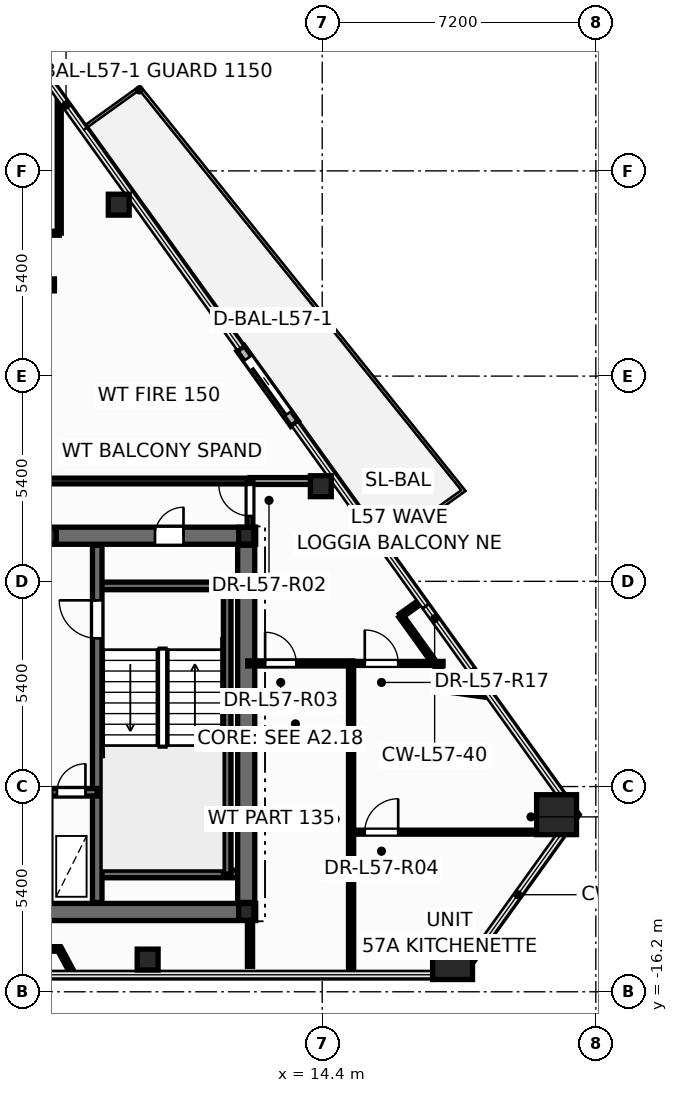
"""IFC4 building model, lengths in metres.
Left out: names, types, materials, properties, quantities, classifications, styles, units other than length and angle.
Written with IfcOpenShell. Run it as: python <this file> out.ifc"""

import sys

from ifc_helpers import new_model, si_unit, direction, frame, frame_2d, origin, origin_2d, place, context, subcontext, project, spatial, rectangle, hollow_rectangle, hollow_circle, i_section, extrude, element, fill, save


model = new_model("IFC4")
c1 = context("Model", 3, precision=1e-05, world=origin(), true_north=direction((0.0, 1.0)))
c2 = subcontext(c1, "Body", "Model", "MODEL_VIEW")
j1 = project(units=[si_unit("LENGTHUNIT", "METRE"), si_unit("PLANEANGLEUNIT", "RADIAN")], contexts=[c1])
p1 = place(None, origin())
s1 = spatial("IfcSite", under=j1, at=p1, CompositionType="ELEMENT")
p2 = place(p1, origin())
s2 = spatial("IfcBuilding", under=s1, at=p2, CompositionType="ELEMENT")
p3 = place(p2, frame((0.0, 0.0, 218.1)))
s3 = spatial("IfcBuildingStorey", under=s2, at=p3, CompositionType="ELEMENT", Elevation=218.1)
for number, where, z_axis, x_axis in (
    (1, (17.83, -15.352, 0.0), (0.0, 0.0, 1.0), (1.0, 0.0, 0.0)),
    (2, (20.567, -11.54, 0.0), (0.0, 0.0, 1.0), (1.0, 0.0, 0.0)),
):
    element("IfcColumn", number, at=place(p3, frame(where, z_axis=z_axis, x_axis=x_axis)), inside=s3, PredefinedType="COLUMN", context=c2, shape_type="SweptSolid", body=[
        extrude(hollow_rectangle(XDim=1.05, YDim=1.05, WallThickness=0.045, at=origin_2d()), origin(), (0.0, 0.0, 1.0), 3.6),
    ])
for number, where, z_axis, x_axis in (
    (3, (9.807, -15.352, 0.0), (0.0, 0.0, 1.0), (1.0, 0.0, 0.0)),
    (4, (14.363, -2.897, 0.0), (0.0, 0.0, 1.0), (1.0, 0.0, 0.0)),
    (5, (9.046, 4.51, 0.0), (0.0, 0.0, 1.0), (1.0, 0.0, 0.0)),
):
    element("IfcColumn", number, at=place(p3, frame(where, z_axis=z_axis, x_axis=x_axis)), inside=s3, PredefinedType="COLUMN", context=c2, shape_type="SweptSolid", body=[
        extrude(hollow_circle(Radius=0.275, WallThickness=0.024, at=origin_2d()), origin(), (0.0, 0.0, 1.0), 3.6),
    ])
for number, where, z_axis, x_axis in (
    (6, (12.4, -14.1, 0.0), (0.0, 0.0, 1.0), (1.0, 0.0, 0.0)),
    (7, (12.4, -4.2, 0.0), (0.0, 0.0, 1.0), (1.0, 0.0, 0.0)),
):
    element("IfcColumn", number, at=place(p3, frame(where, z_axis=z_axis, x_axis=x_axis)), inside=s3, PredefinedType="COLUMN", context=c2, shape_type="SweptSolid", body=[
        extrude(i_section(OverallWidth=0.4, OverallDepth=0.44, WebThickness=0.028, FlangeThickness=0.04, at=origin_2d()), origin(), (0.0, 0.0, 1.0), 3.6),
    ])
p4 = place(p3, frame((7.2, -4.2, 0.0), z_axis=(0.0, 0.0, 1.0), x_axis=(1.0, 0.0, 0.0)))
e8 = element("IfcColumn", 8, at=p4, inside=s3, PredefinedType="PILASTER", context=c2, shape_type="SweptSolid", body=[
    extrude(i_section(OverallWidth=0.405, OverallDepth=0.414, WebThickness=0.022, FlangeThickness=0.032, at=origin_2d()), origin(), (0.0, 0.0, 1.0), 3.6),
])
p5 = place(p3, frame((7.2, 2.4, 0.0), z_axis=(0.0, 0.0, 1.0), x_axis=(1.0, 0.0, 0.0)))
e9 = element("IfcColumn", 9, at=p5, inside=s3, PredefinedType="COLUMN", context=c2, shape_type="SweptSolid", body=[
    extrude(i_section(OverallWidth=0.307, OverallDepth=0.314, WebThickness=0.012, FlangeThickness=0.019, at=origin_2d()), origin(), (0.0, 0.0, 1.0), 3.6),
])
p6 = place(p3, frame((13.675, -1.252, -0.015), z_axis=(0.0, 0.0, 1.0), x_axis=(-0.583139062732, 0.812372349059, 0.0)))
e10 = element("IfcWall", 10, at=p6, inside=s3, PredefinedType="STANDARD", context=c2, shape_type="SweptSolid", body=[
    extrude(rectangle(XDim=2.44, YDim=0.24, at=frame_2d((1.22, 0.0))), origin(), (0.0, 0.0, 1.0), 2.878),
])
p7 = place(p6, frame((0.32, 0.0, 0.015)))
e11 = element("IfcOpeningElement", 11, at=p7, cuts=e10, PredefinedType="OPENING", context=c2, shape_type="SweptSolid", body=[
    extrude(rectangle(XDim=1.806, YDim=2.204, at=frame_2d((0.9, 1.102))), frame((0.0, 0.13, 0.0), z_axis=(0.0, -1.0, 0.0), x_axis=(1.0, 0.0, 0.0)), (0.0, 0.0, 1.0), 0.26),
])
p8 = place(p3, frame((-12.65, -14.1, 0.0), z_axis=(0.0, 0.0, 1.0), x_axis=(1.0, 0.0, 0.0)))
e12 = element("IfcWall", 12, at=p8, inside=s3, PredefinedType="SHEAR", context=c2, shape_type="SweptSolid", body=[
    extrude(rectangle(XDim=25.3, YDim=0.45, at=frame_2d((12.65, 0.0))), origin(), (0.0, 0.0, 1.0), 3.6),
])
p9 = place(p3, frame((-12.65, -4.2, 0.0), z_axis=(0.0, 0.0, 1.0), x_axis=(1.0, 0.0, 0.0)))
e13 = element("IfcWall", 13, at=p9, inside=s3, PredefinedType="SHEAR", context=c2, shape_type="SweptSolid", body=[
    extrude(rectangle(XDim=25.3, YDim=0.45, at=frame_2d((12.65, 0.0))), origin(), (0.0, 0.0, 1.0), 3.6),
])
p10 = place(p9, frame((1.85, 0.0, 0.0)))
e14 = element("IfcOpeningElement", 14, at=p10, cuts=e13, PredefinedType="OPENING", context=c2, shape_type="SweptSolid", body=[
    extrude(rectangle(XDim=0.756, YDim=2.054, at=frame_2d((0.375, 1.027))), frame((0.0, 0.235, 0.0), z_axis=(0.0, -1.0, 0.0), x_axis=(1.0, 0.0, 0.0)), (0.0, 0.0, 1.0), 0.47),
])
p11 = place(p9, frame((22.65, 0.0, 0.0)))
e15 = element("IfcOpeningElement", 15, at=p11, cuts=e13, PredefinedType="OPENING", context=c2, shape_type="SweptSolid", body=[
    extrude(rectangle(XDim=0.756, YDim=2.054, at=frame_2d((0.375, 1.027))), frame((0.0, 0.235, 0.0), z_axis=(0.0, -1.0, 0.0), x_axis=(1.0, 0.0, 0.0)), (0.0, 0.0, 1.0), 0.47),
])
p12 = place(p9, frame((5.85, 0.0, 0.0)))
e16 = element("IfcOpeningElement", 16, at=p12, cuts=e13, PredefinedType="OPENING", context=c2, shape_type="SweptSolid", body=[
    extrude(rectangle(XDim=1.006, YDim=2.104, at=frame_2d((0.5, 1.052))), frame((0.0, 0.235, 0.0), z_axis=(0.0, -1.0, 0.0), x_axis=(1.0, 0.0, 0.0)), (0.0, 0.0, 1.0), 0.47),
])
p13 = place(p9, frame((10.35, 0.0, 0.0)))
e17 = element("IfcOpeningElement", 17, at=p13, cuts=e13, PredefinedType="OPENING", context=c2, shape_type="SweptSolid", body=[
    extrude(rectangle(XDim=1.406, YDim=2.154, at=frame_2d((0.7, 1.077))), frame((0.0, 0.235, 0.0), z_axis=(0.0, -1.0, 0.0), x_axis=(1.0, 0.0, 0.0)), (0.0, 0.0, 1.0), 0.47),
])
p14 = place(p9, frame((18.45, 0.0, 0.0)))
e18 = element("IfcOpeningElement", 18, at=p14, cuts=e13, PredefinedType="OPENING", context=c2, shape_type="SweptSolid", body=[
    extrude(rectangle(XDim=1.006, YDim=2.104, at=frame_2d((0.5, 1.052))), frame((0.0, 0.235, 0.0), z_axis=(0.0, -1.0, 0.0), x_axis=(1.0, 0.0, 0.0)), (0.0, 0.0, 1.0), 0.47),
])
for number, where, z_axis, x_axis in (
    (19, (8.48, -5.52, 0.0), (0.0, 0.0, 1.0), (1.0, 0.0, 0.0)),
    (20, (8.48, -13.1, 0.0), (0.0, 0.0, 1.0), (1.0, 0.0, 0.0)),
):
    element("IfcWall", number, at=place(p3, frame(where, z_axis=z_axis, x_axis=x_axis)), inside=s3, PredefinedType="SOLIDWALL", context=c2, shape_type="SweptSolid", body=[
        extrude(rectangle(XDim=3.87, YDim=0.2, at=frame_2d((1.935, 0.0))), origin(), (0.0, 0.0, 1.0), 3.6),
    ])
p15 = place(p3, frame((11.9, -13.1, 0.0), z_axis=(0.0, 0.0, 1.0), x_axis=(0.0, 1.0, 0.0)))
e21 = element("IfcWall", 21, at=p15, inside=s3, PredefinedType="SOLIDWALL", context=c2, shape_type="SweptSolid", body=[
    extrude(rectangle(XDim=7.58, YDim=0.2, at=frame_2d((3.79, 0.0))), origin(), (0.0, 0.0, 1.0), 3.6),
])
p16 = place(p3, frame((8.48, -13.85, 0.0), z_axis=(0.0, 0.0, 1.0), x_axis=(0.0, 1.0, 0.0)))
e22 = element("IfcWall", 22, at=p16, inside=s3, PredefinedType="SHEAR", context=c2, shape_type="SweptSolid", body=[
    extrude(rectangle(XDim=9.4, YDim=0.25, at=frame_2d((4.7, 0.0))), origin(), (0.0, 0.0, 1.0), 3.6),
])
p17 = place(p16, frame((6.95, 0.0, 0.0)))
e23 = element("IfcOpeningElement", 23, at=p17, cuts=e22, PredefinedType="OPENING", context=c2, shape_type="SweptSolid", body=[
    extrude(rectangle(XDim=1.006, YDim=2.104, at=frame_2d((0.5, 1.052))), frame((0.0, 0.135, 0.0), z_axis=(0.0, -1.0, 0.0), x_axis=(1.0, 0.0, 0.0)), (0.0, 0.0, 1.0), 0.27),
])
p18 = place(p3, frame((5.12, -10.95, 0.0), z_axis=(0.0, 0.0, 1.0), x_axis=(1.0, 0.0, 0.0)))
e24 = element("IfcWall", 24, at=p18, inside=s3, PredefinedType="SOLIDWALL", context=c2, shape_type="SweptSolid", body=[
    extrude(rectangle(XDim=3.36, YDim=0.2, at=frame_2d((1.68, 0.0))), origin(), (0.0, 0.0, 1.0), 3.6),
])
p19 = place(p18, frame((0.42, 0.0, 0.0)))
e25 = element("IfcOpeningElement", 25, at=p19, cuts=e24, PredefinedType="OPENING", context=c2, shape_type="SweptSolid", body=[
    extrude(rectangle(XDim=1.106, YDim=2.104, at=frame_2d((0.55, 1.052))), frame((0.0, 0.11, 0.0), z_axis=(0.0, -1.0, 0.0), x_axis=(1.0, 0.0, 0.0)), (0.0, 0.0, 1.0), 0.22),
])
p20 = place(p18, frame((2.3, 0.0, 0.0)))
e26 = element("IfcOpeningElement", 26, at=p20, cuts=e24, PredefinedType="OPENING", context=c2, shape_type="SweptSolid", body=[
    extrude(rectangle(XDim=0.756, YDim=2.054, at=frame_2d((0.375, 1.027))), frame((0.0, 0.11, 0.0), z_axis=(0.0, -1.0, 0.0), x_axis=(1.0, 0.0, 0.0)), (0.0, 0.0, 1.0), 0.22),
])
p21 = place(p3, frame((12.4, -13.85, 0.0), z_axis=(0.0, 0.0, 1.0), x_axis=(0.0, 1.0, 0.0)))
e27 = element("IfcWall", 27, at=p21, inside=s3, PredefinedType="SHEAR", context=c2, shape_type="SweptSolid", body=[
    extrude(rectangle(XDim=9.4, YDim=0.45, at=frame_2d((4.7, 0.0))), origin(), (0.0, 0.0, 1.0), 3.6),
])
p22 = place(p3, frame((3.54, -2.76, 0.0), z_axis=(0.0, 0.0, 1.0), x_axis=(1.0, 0.0, 0.0)))
e28 = element("IfcWall", 28, at=p22, inside=s3, PredefinedType="PARTITIONING", context=c2, shape_type="SweptSolid", body=[
    extrude(rectangle(XDim=8.96, YDim=0.15, at=frame_2d((4.48, 0.0))), origin(), (0.0, 0.0, 1.0), 2.32),
])
p23 = place(p22, frame((0.399, 0.0, 0.0)))
e29 = element("IfcOpeningElement", 29, at=p23, cuts=e28, PredefinedType="OPENING", context=c2, shape_type="SweptSolid", body=[
    extrude(rectangle(XDim=0.906, YDim=2.104, at=frame_2d((0.45, 1.052))), frame((0.0, 0.085, 0.0), z_axis=(0.0, -1.0, 0.0), x_axis=(1.0, 0.0, 0.0)), (0.0, 0.0, 1.0), 0.17),
])
p24 = place(p3, frame((15.16, -12.0, 0.0), z_axis=(0.0, 0.0, 1.0), x_axis=(1.0, 0.0, 0.0)))
e30 = element("IfcWall", 30, at=p24, inside=s3, PredefinedType="PARTITIONING", context=c2, shape_type="SweptSolid", body=[
    extrude(rectangle(XDim=5.569, YDim=0.105, at=frame_2d((2.784, 0.0))), origin(), (0.0, 0.0, 1.0), 2.863),
])
p25 = place(p24, frame((0.359, 0.0, 0.0)))
e31 = element("IfcOpeningElement", 31, at=p25, cuts=e30, PredefinedType="OPENING", context=c2, shape_type="SweptSolid", body=[
    extrude(rectangle(XDim=0.886, YDim=2.104, at=frame_2d((0.44, 1.052))), frame((0.0, 0.062, 0.0), z_axis=(0.0, -1.0, 0.0), x_axis=(1.0, 0.0, 0.0)), (0.0, 0.0, 1.0), 0.125),
])
p26 = place(p3, frame((15.16, -15.752, 0.0), z_axis=(0.0, 0.0, 1.0), x_axis=(0.0, 1.0, 0.0)))
e32 = element("IfcWall", 32, at=p26, inside=s3, PredefinedType="PARTITIONING", context=c2, shape_type="SweptSolid", body=[
    extrude(rectangle(XDim=8.192, YDim=0.135, at=frame_2d((4.096, 0.0))), origin(), (0.0, 0.0, 1.0), 2.863),
])
p27 = place(p3, frame((3.143, -15.072, 0.0), z_axis=(0.0, 0.0, 1.0), x_axis=(1.0, 0.0, 0.0)))
e33 = element("IfcWall", 33, at=p27, inside=s3, PredefinedType="PARTITIONING", context=c2, shape_type="SweptSolid", body=[
    extrude(rectangle(XDim=4.343, YDim=0.12, at=frame_2d((2.171, 0.0))), origin(), (0.0, 0.0, 1.0), 3.345),
])
p28 = place(p3, frame((7.48, 3.76, 0.0), z_axis=(0.0, 0.0, 1.0), x_axis=(0.0, 1.0, 0.0)))
e34 = element("IfcWall", 34, at=p28, inside=s3, PredefinedType="PARTITIONING", context=c2, shape_type="SweptSolid", body=[
    extrude(rectangle(XDim=3.619, YDim=0.105, at=frame_2d((1.81, 0.0))), origin(), (0.0, 0.0, 1.0), 2.62),
])
p29 = place(p3, frame((3.6, 3.76, 0.0), z_axis=(0.0, 0.0, 1.0), x_axis=(1.0, 0.0, 0.0)))
e35 = element("IfcWall", 35, at=p29, inside=s3, PredefinedType="PARTITIONING", context=c2, shape_type="SweptSolid", body=[
    extrude(rectangle(XDim=3.88, YDim=0.105, at=frame_2d((1.94, 0.0))), origin(), (0.0, 0.0, 1.0), 2.62),
])
p30 = place(p3, frame((12.44, -7.56, 0.0), z_axis=(0.0, 0.0, 1.0), x_axis=(1.0, 0.0, 0.0)))
e36 = element("IfcWall", 36, at=p30, inside=s3, PredefinedType="PARTITIONING", context=c2, shape_type="SweptSolid", body=[
    extrude(rectangle(XDim=2.76, YDim=0.135, at=frame_2d((1.38, 0.0))), origin(), (0.0, 0.0, 1.0), 2.863),
])
p31 = place(p30, frame((0.458, 0.0, 0.0)))
e37 = element("IfcOpeningElement", 37, at=p31, cuts=e36, PredefinedType="OPENING", context=c2, shape_type="SweptSolid", body=[
    extrude(rectangle(XDim=0.826, YDim=2.104, at=frame_2d((0.41, 1.052))), frame((0.0, 0.078, 0.0), z_axis=(0.0, -1.0, 0.0), x_axis=(1.0, 0.0, 0.0)), (0.0, 0.0, 1.0), 0.155),
])
p32 = place(p3, frame((15.202, -7.56, 0.0), z_axis=(0.0, 0.0, 1.0), x_axis=(1.0, 0.0, 0.0)))
e38 = element("IfcWall", 38, at=p32, inside=s3, PredefinedType="PARTITIONING", context=c2, shape_type="SweptSolid", body=[
    extrude(rectangle(XDim=2.378, YDim=0.105, at=frame_2d((1.189, 0.0))), origin(), (0.0, 0.0, 1.0), 2.32),
])
p33 = place(p32, frame((0.318, 0.0, 0.0)))
e39 = element("IfcOpeningElement", 39, at=p33, cuts=e38, PredefinedType="OPENING", context=c2, shape_type="SweptSolid", body=[
    extrude(rectangle(XDim=0.886, YDim=2.104, at=frame_2d((0.44, 1.052))), frame((0.0, 0.062, 0.0), z_axis=(0.0, -1.0, 0.0), x_axis=(1.0, 0.0, 0.0)), (0.0, 0.0, 1.0), 0.125),
])
p34 = place(p3, frame((17.878, -8.274, 0.0), z_axis=(0.0, 0.0, 1.0), x_axis=(-0.583153890419, 0.812361705208, 0.0)))
e40 = element("IfcWall", 40, at=p34, inside=s3, PredefinedType="PARTITIONING", context=c2, shape_type="SweptSolid", body=[
    extrude(rectangle(XDim=2.421, YDim=0.12, at=frame_2d((1.21, 0.0))), origin(), (0.0, 0.0, 1.0), 3.345),
])
p35 = place(p3, frame((12.5, -2.76, 0.0), z_axis=(0.0, 0.0, 1.0), x_axis=(1.0, 0.0, 0.0)))
e41 = element("IfcWall", 41, at=p35, inside=s3, PredefinedType="PARTITIONING", context=c2, shape_type="SweptSolid", body=[
    extrude(rectangle(XDim=2.257, YDim=0.18, at=frame_2d((1.129, 0.0))), origin(), (0.0, 0.0, 1.0), 2.62),
])
p36 = place(p3, frame((12.5, -4.24, 0.0), z_axis=(0.0, 0.0, 1.0), x_axis=(0.0, 1.0, 0.0)))
e42 = element("IfcWall", 42, at=p36, inside=s3, PredefinedType="PARTITIONING", context=c2, shape_type="SweptSolid", body=[
    extrude(rectangle(XDim=1.48, YDim=0.15, at=frame_2d((0.74, 0.0))), origin(), (0.0, 0.0, 1.0), 2.32),
])
p37 = place(p36, frame((0.56, 0.0, 0.0)))
e43 = element("IfcOpeningElement", 43, at=p37, cuts=e42, PredefinedType="OPENING", context=c2, shape_type="SweptSolid", body=[
    extrude(rectangle(XDim=0.826, YDim=2.104, at=frame_2d((0.41, 1.052))), frame((0.0, 0.085, 0.0), z_axis=(0.0, -1.0, 0.0), x_axis=(1.0, 0.0, 0.0)), (0.0, 0.0, 1.0), 0.17),
])
p38 = place(p3, frame((18.719, -8.394, 0.0), z_axis=(0.0, 0.0, 1.0), x_axis=(-0.990018406644, 0.140938122968, 0.0)))
e44 = element("IfcWall", 44, at=p38, inside=s3, PredefinedType="PARTITIONING", context=c2, shape_type="SweptSolid", body=[
    extrude(rectangle(XDim=0.849, YDim=0.12, at=frame_2d((0.424, 0.0))), origin(), (0.0, 0.0, 1.0), 2.863),
])
p39 = place(p3, frame((7.486, -15.072, 0.0), z_axis=(0.0, 0.0, 1.0), x_axis=(0.472969716316, -0.881078684027, 0.0)))
e45 = element("IfcWall", 45, at=p39, inside=s3, PredefinedType="PARTITIONING", context=c2, shape_type="SweptSolid", body=[
    extrude(rectangle(XDim=0.76, YDim=0.12, at=frame_2d((0.38, 0.0))), origin(), (0.0, 0.0, 1.0), 2.863),
])
p40 = place(p3, frame((16.466, -6.307, 0.0), z_axis=(0.0, 0.0, 1.0), x_axis=(0.81250073396, 0.582960167863, 0.0)))
e46 = element("IfcWall", 46, at=p40, inside=s3, PredefinedType="PARTITIONING", context=c2, shape_type="SweptSolid", body=[
    extrude(rectangle(XDim=0.67, YDim=0.12, at=frame_2d((0.335, 0.0))), origin(), (0.0, 0.0, 1.0), 2.863),
])
p41 = place(p3, frame((12.5, -15.532, 0.0), z_axis=(0.0, 0.0, 1.0), x_axis=(0.0, 1.0, 0.0)))
e47 = element("IfcWall", 47, at=p41, inside=s3, PredefinedType="PARTITIONING", context=c2, shape_type="SweptSolid", body=[
    extrude(rectangle(XDim=1.132, YDim=0.135, at=frame_2d((0.566, 0.0))), origin(), (0.0, 0.0, 1.0), 2.863),
])
p42 = place(p7, origin())
e48 = element("IfcDoor", 48, at=p42, inside=s3, OperationType="SLIDING_TO_LEFT", PredefinedType="DOOR", context=c2, shape_type="SweptSolid", body=[
    extrude(rectangle(XDim=1.8, YDim=2.2, at=frame_2d((0.9, 1.1))), frame((0.0, 0.025, 0.0), z_axis=(0.0, -1.0, 0.0), x_axis=(1.0, 0.0, 0.0)), (0.0, 0.0, 1.0), 0.05),
])
fill(e11, e48)
p43 = place(p17, origin())
e49 = element("IfcDoor", 49, at=p43, inside=s3, OperationType="SINGLE_SWING_RIGHT", PredefinedType="DOOR", context=c2, shape_type="SweptSolid", body=[
    extrude(rectangle(XDim=1.0, YDim=2.1, at=frame_2d((0.5, 1.05))), frame((0.0, 0.025, 0.0), z_axis=(0.0, -1.0, 0.0), x_axis=(1.0, 0.0, 0.0)), (0.0, 0.0, 1.0), 0.05),
])
fill(e23, e49)
p44 = place(p20, origin())
e50 = element("IfcDoor", 50, at=p44, inside=s3, OperationType="SINGLE_SWING_RIGHT", PredefinedType="DOOR", context=c2, shape_type="SweptSolid", body=[
    extrude(rectangle(XDim=0.75, YDim=2.05, at=frame_2d((0.375, 1.025))), frame((0.0, 0.025, 0.0), z_axis=(0.0, -1.0, 0.0), x_axis=(1.0, 0.0, 0.0)), (0.0, 0.0, 1.0), 0.05),
])
fill(e26, e50)
p45 = place(p11, origin())
e51 = element("IfcDoor", 51, at=p45, inside=s3, OperationType="SINGLE_SWING_RIGHT", PredefinedType="DOOR", context=c2, shape_type="SweptSolid", body=[
    extrude(rectangle(XDim=0.75, YDim=2.05, at=frame_2d((0.375, 1.025))), frame((0.0, 0.025, 0.0), z_axis=(0.0, -1.0, 0.0), x_axis=(1.0, 0.0, 0.0)), (0.0, 0.0, 1.0), 0.05),
])
fill(e15, e51)
p46 = place(p37, origin())
e52 = element("IfcDoor", 52, at=p46, inside=s3, OperationType="SINGLE_SWING_RIGHT", PredefinedType="DOOR", context=c2, shape_type="SweptSolid", body=[
    extrude(rectangle(XDim=0.82, YDim=2.1, at=frame_2d((0.41, 1.05))), frame((0.0, 0.025, 0.0), z_axis=(0.0, -1.0, 0.0), x_axis=(1.0, 0.0, 0.0)), (0.0, 0.0, 1.0), 0.05),
])
fill(e43, e52)
p47 = place(p31, origin())
e53 = element("IfcDoor", 53, at=p47, inside=s3, OperationType="SINGLE_SWING_LEFT", PredefinedType="DOOR", context=c2, shape_type="SweptSolid", body=[
    extrude(rectangle(XDim=0.82, YDim=2.1, at=frame_2d((0.41, 1.05))), frame((0.0, 0.025, 0.0), z_axis=(0.0, -1.0, 0.0), x_axis=(1.0, 0.0, 0.0)), (0.0, 0.0, 1.0), 0.05),
])
fill(e37, e53)
p48 = place(p25, origin())
e54 = element("IfcDoor", 54, at=p48, inside=s3, OperationType="SINGLE_SWING_RIGHT", PredefinedType="DOOR", context=c2, shape_type="SweptSolid", body=[
    extrude(rectangle(XDim=0.88, YDim=2.1, at=frame_2d((0.44, 1.05))), frame((0.0, 0.025, 0.0), z_axis=(0.0, -1.0, 0.0), x_axis=(1.0, 0.0, 0.0)), (0.0, 0.0, 1.0), 0.05),
])
fill(e31, e54)
p49 = place(p33, origin())
e55 = element("IfcDoor", 55, at=p49, inside=s3, OperationType="SINGLE_SWING_LEFT", PredefinedType="DOOR", context=c2, shape_type="SweptSolid", body=[
    extrude(rectangle(XDim=0.88, YDim=2.1, at=frame_2d((0.44, 1.05))), frame((0.0, 0.025, 0.0), z_axis=(0.0, -1.0, 0.0), x_axis=(1.0, 0.0, 0.0)), (0.0, 0.0, 1.0), 0.05),
])
fill(e39, e55)
save(model, sys.argv[1])
